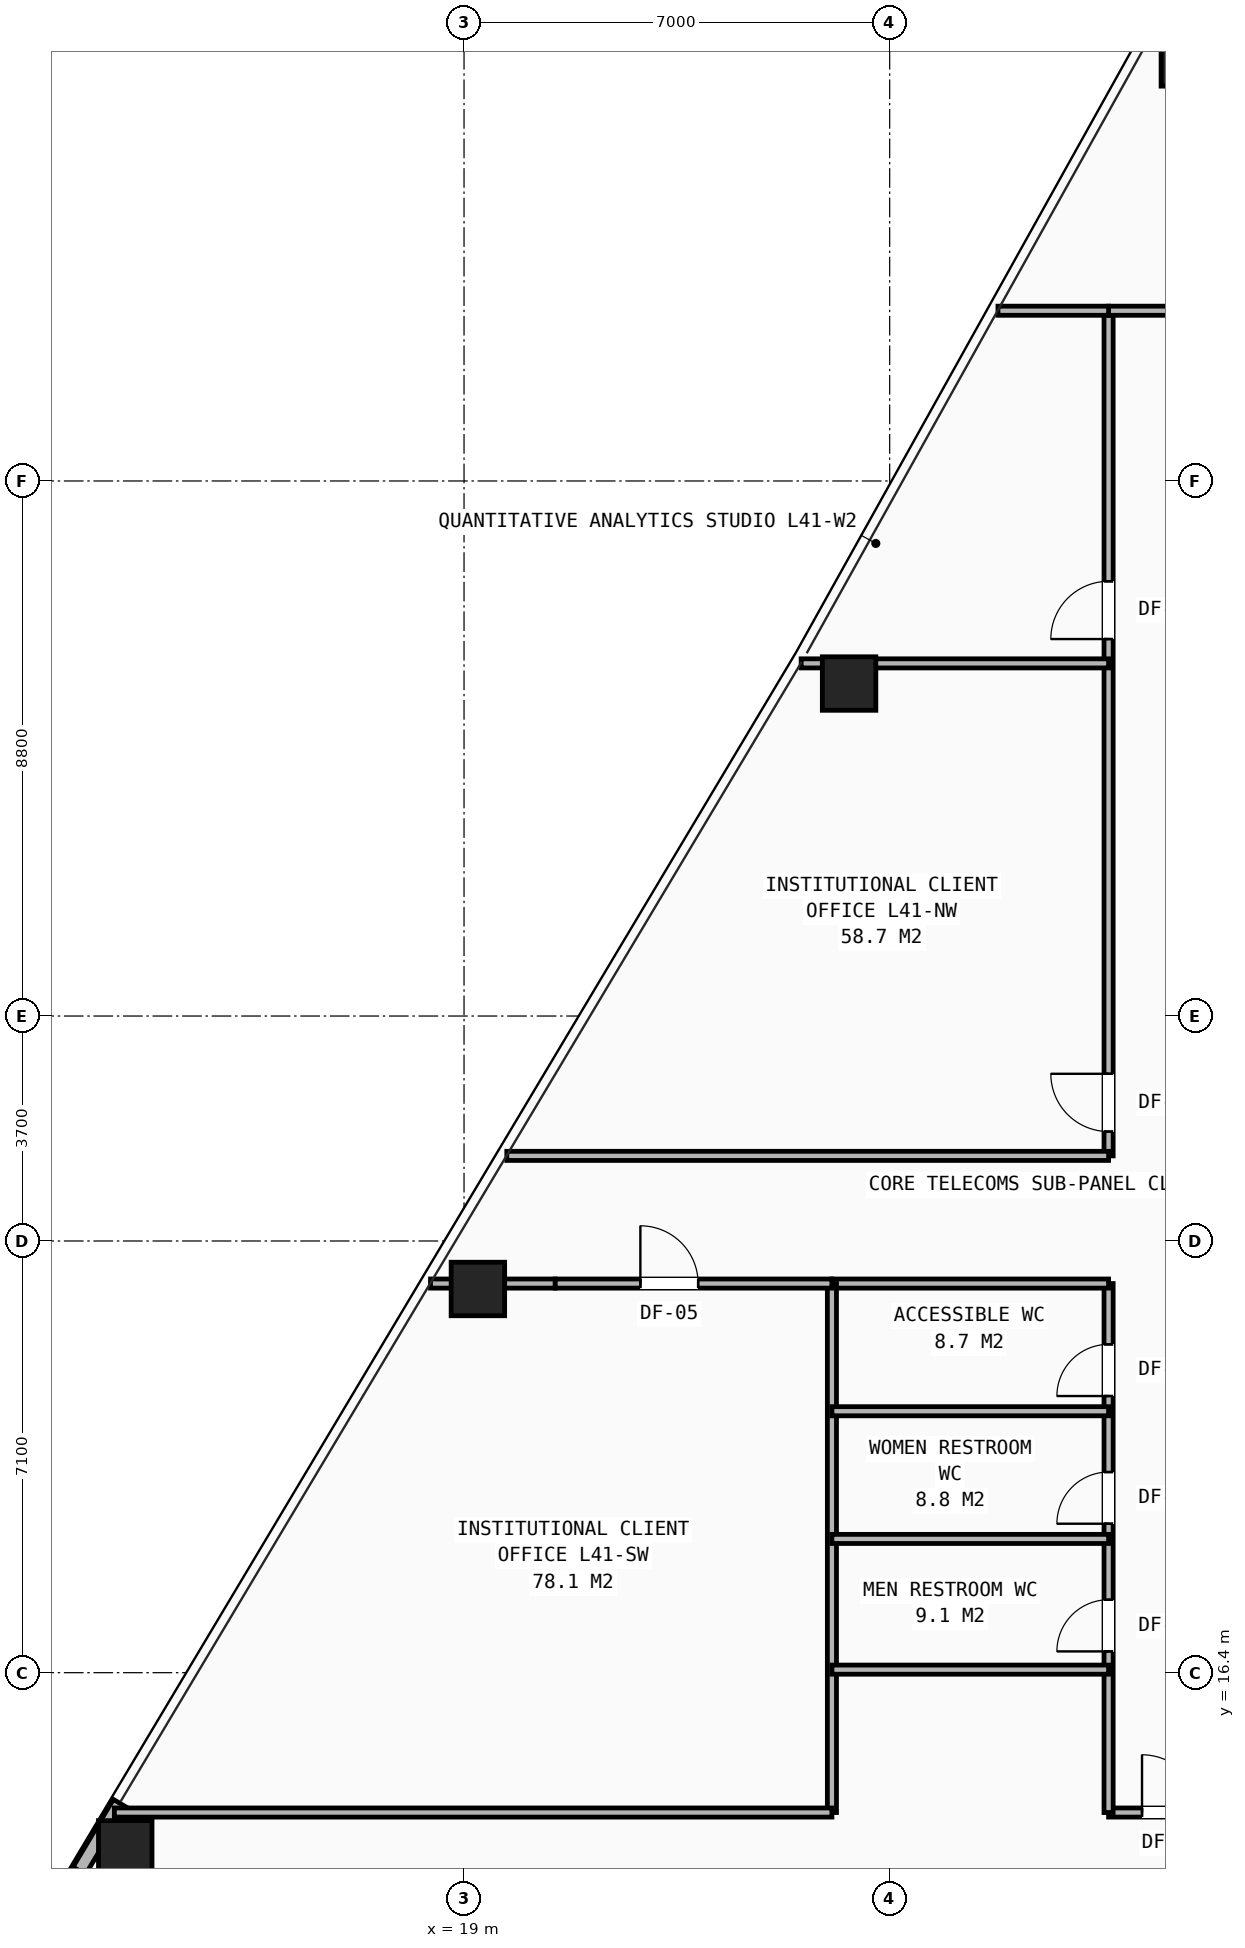
"""IFC4 building model, lengths in metres.
Left out: names, types, materials, properties, quantities, classifications, styles, units other than length and angle.
Written with IfcOpenShell. Run it as: python <this file> out.ifc"""

import sys

from ifc_helpers import new_model, si_unit, direction, frame, frame_2d, origin, origin_2d, place, context, subcontext, project, spatial, rectangle, hollow_rectangle, extrude, element, fill, save


model = new_model("IFC4")
c1 = context("Model", 3, precision=1e-05, world=origin(), true_north=direction((0.0, 1.0)))
c2 = subcontext(c1, "Body", "Model", "MODEL_VIEW")
j1 = project(units=[si_unit("LENGTHUNIT", "METRE"), si_unit("PLANEANGLEUNIT", "RADIAN")], contexts=[c1])
p1 = place(None, origin())
s1 = spatial("IfcSite", under=j1, at=p1, CompositionType="ELEMENT")
p2 = place(p1, origin())
s2 = spatial("IfcBuilding", under=s1, at=p2, CompositionType="ELEMENT")
p3 = place(p2, frame((0.0, 0.0, 143.6)))
s3 = spatial("IfcBuildingStorey", under=s2, at=p3, CompositionType="ELEMENT", Elevation=143.6)
for number, where, z_axis, x_axis in (
    (1, (30.904, 42.934, 0.0), (0.0, 0.0, 1.0), (1.0, 0.0, 0.0)),
    (2, (25.333, 32.668, 0.0), (0.0, 0.0, 1.0), (1.0, 0.0, 0.0)),
    (3, (19.228, 22.711, 0.0), (0.0, 0.0, 1.0), (1.0, 0.0, 0.0)),
    (4, (13.428, 13.527, 0.0), (0.0, 0.0, 1.0), (1.0, 0.0, 0.0)),
):
    element("IfcColumn", number, at=place(p3, frame(where, z_axis=z_axis, x_axis=x_axis)), inside=s3, PredefinedType="COLUMN", context=c2, shape_type="SweptSolid", body=[
        extrude(hollow_rectangle(XDim=0.88, YDim=0.88, WallThickness=0.06, at=origin_2d()), origin(), (0.0, 0.0, 1.0), 3.45),
    ])
p4 = place(p3, frame((13.336, 14.254, 0.0), z_axis=(0.0, 0.0, 1.0), x_axis=(-0.513024934393, -0.858373704567, 0.0)))
e5 = element("IfcWall", 5, at=p4, inside=s3, PredefinedType="SHEAR", context=c2, shape_type="SweptSolid", body=[
    extrude(rectangle(XDim=1.294, YDim=0.24, at=frame_2d((0.647, 0.0))), origin(), (0.0, 0.0, 1.0), 2.583),
])
p5 = place(p3, frame((29.6, 14.1, 0.0), z_axis=(0.0, 0.0, 1.0), x_axis=(1.0, 0.0, 0.0)))
e6 = element("IfcWall", 6, at=p5, inside=s3, PredefinedType="PARTITIONING", context=c2, shape_type="SweptSolid", body=[
    extrude(rectangle(XDim=18.6, YDim=0.15, at=frame_2d((9.3, 0.0))), origin(), (0.0, 0.0, 1.0), 2.252),
])
p6 = place(p5, frame((0.55, 0.0, 0.0)))
e7 = element("IfcOpeningElement", 7, at=p6, cuts=e6, PredefinedType="OPENING", context=c2, shape_type="SweptSolid", body=[
    extrude(rectangle(XDim=0.95, YDim=2.1, at=frame_2d((0.475, 1.05))), frame((0.0, 0.085, 0.0), z_axis=(0.0, -1.0, 0.0), x_axis=(1.0, 0.0, 0.0)), (0.0, 0.0, 1.0), 0.17),
])
p7 = place(p3, frame((29.6, 14.1, 0.0), z_axis=(0.0, 0.0, 1.0), x_axis=(0.0, 1.0, 0.0)))
e8 = element("IfcWall", 8, at=p7, inside=s3, PredefinedType="PARTITIONING", context=c2, shape_type="SweptSolid", body=[
    extrude(rectangle(XDim=8.7, YDim=0.15, at=frame_2d((4.35, 0.0))), origin(), (0.0, 0.0, 1.0), 3.21),
])
p8 = place(p7, frame((2.65, 0.0, 0.0)))
e9 = element("IfcOpeningElement", 9, at=p8, cuts=e8, PredefinedType="OPENING", context=c2, shape_type="SweptSolid", body=[
    extrude(rectangle(XDim=0.85, YDim=2.05, at=frame_2d((0.425, 1.025))), frame((0.0, 0.085, 0.0), z_axis=(0.0, -1.0, 0.0), x_axis=(1.0, 0.0, 0.0)), (0.0, 0.0, 1.0), 0.17),
])
p9 = place(p7, frame((4.75, 0.0, 0.0)))
e10 = element("IfcOpeningElement", 10, at=p9, cuts=e8, PredefinedType="OPENING", context=c2, shape_type="SweptSolid", body=[
    extrude(rectangle(XDim=0.85, YDim=2.05, at=frame_2d((0.425, 1.025))), frame((0.0, 0.085, 0.0), z_axis=(0.0, -1.0, 0.0), x_axis=(1.0, 0.0, 0.0)), (0.0, 0.0, 1.0), 0.17),
])
p10 = place(p7, frame((6.85, 0.0, 0.0)))
e11 = element("IfcOpeningElement", 11, at=p10, cuts=e8, PredefinedType="OPENING", context=c2, shape_type="SweptSolid", body=[
    extrude(rectangle(XDim=0.85, YDim=2.05, at=frame_2d((0.425, 1.025))), frame((0.0, 0.085, 0.0), z_axis=(0.0, -1.0, 0.0), x_axis=(1.0, 0.0, 0.0)), (0.0, 0.0, 1.0), 0.17),
])
p11 = place(p3, frame((29.6, 24.9, 0.0), z_axis=(0.0, 0.0, 1.0), x_axis=(0.0, 1.0, 0.0)))
e12 = element("IfcWall", 12, at=p11, inside=s3, PredefinedType="PARTITIONING", context=c2, shape_type="SweptSolid", body=[
    extrude(rectangle(XDim=13.9, YDim=0.15, at=frame_2d((6.95, 0.0))), origin(), (0.0, 0.0, 1.0), 2.252),
])
p12 = place(p11, frame((0.4, 0.0, 0.0)))
e13 = element("IfcOpeningElement", 13, at=p12, cuts=e12, PredefinedType="OPENING", context=c2, shape_type="SweptSolid", body=[
    extrude(rectangle(XDim=0.95, YDim=2.1, at=frame_2d((0.475, 1.05))), frame((0.0, 0.085, 0.0), z_axis=(0.0, -1.0, 0.0), x_axis=(1.0, 0.0, 0.0)), (0.0, 0.0, 1.0), 0.17),
])
p13 = place(p11, frame((8.5, 0.0, 0.0)))
e14 = element("IfcOpeningElement", 14, at=p13, cuts=e12, PredefinedType="OPENING", context=c2, shape_type="SweptSolid", body=[
    extrude(rectangle(XDim=0.95, YDim=2.1, at=frame_2d((0.475, 1.05))), frame((0.0, 0.085, 0.0), z_axis=(0.0, -1.0, 0.0), x_axis=(1.0, 0.0, 0.0)), (0.0, 0.0, 1.0), 0.17),
])
p14 = place(p3, frame((29.6, 38.8, 0.0), z_axis=(0.0, 0.0, 1.0), x_axis=(1.0, 0.0, 0.0)))
e15 = element("IfcWall", 15, at=p14, inside=s3, PredefinedType="PARTITIONING", context=c2, shape_type="SweptSolid", body=[
    extrude(rectangle(XDim=2.2, YDim=0.15, at=frame_2d((1.1, 0.0))), origin(), (0.0, 0.0, 1.0), 2.743),
])
p15 = place(p3, frame((18.448, 22.8, 0.0), z_axis=(0.0, 0.0, 1.0), x_axis=(1.0, 0.0, 0.0)))
e16 = element("IfcWall", 16, at=p15, inside=s3, PredefinedType="PARTITIONING", context=c2, shape_type="SweptSolid", body=[
    extrude(rectangle(XDim=2.052, YDim=0.15, at=frame_2d((1.026, 0.0))), origin(), (0.0, 0.0, 1.0), 2.589),
])
p16 = place(p3, frame((25.05, 22.8, 0.0), z_axis=(0.0, 0.0, 1.0), x_axis=(1.0, 0.0, 0.0)))
e17 = element("IfcWall", 17, at=p16, inside=s3, PredefinedType="PARTITIONING", context=c2, shape_type="SweptSolid", body=[
    extrude(rectangle(XDim=4.55, YDim=0.15, at=frame_2d((2.275, 0.0))), origin(), (0.0, 0.0, 1.0), 3.21),
])
p17 = place(p3, frame((19.703, 24.9, 0.0), z_axis=(0.0, 0.0, 1.0), x_axis=(1.0, 0.0, 0.0)))
e18 = element("IfcWall", 18, at=p17, inside=s3, PredefinedType="PARTITIONING", context=c2, shape_type="SweptSolid", body=[
    extrude(rectangle(XDim=9.897, YDim=0.15, at=frame_2d((4.948, 0.0))), origin(), (0.0, 0.0, 1.0), 2.589),
])
p18 = place(p3, frame((25.05, 14.1, 0.0), z_axis=(0.0, 0.0, 1.0), x_axis=(0.0, 1.0, 0.0)))
e19 = element("IfcWall", 19, at=p18, inside=s3, PredefinedType="PARTITIONING", context=c2, shape_type="SweptSolid", body=[
    extrude(rectangle(XDim=8.7, YDim=0.15, at=frame_2d((4.35, 0.0))), origin(), (0.0, 0.0, 1.0), 3.21),
])
for number, where, z_axis, x_axis in (
    (20, (25.05, 16.45, 0.0), (0.0, 0.0, 1.0), (1.0, 0.0, 0.0)),
    (21, (25.05, 18.6, 0.0), (0.0, 0.0, 1.0), (1.0, 0.0, 0.0)),
    (22, (25.05, 20.7, 0.0), (0.0, 0.0, 1.0), (1.0, 0.0, 0.0)),
):
    element("IfcWall", number, at=place(p3, frame(where, z_axis=z_axis, x_axis=x_axis)), inside=s3, PredefinedType="PARTITIONING", context=c2, shape_type="SweptSolid", body=[
        extrude(rectangle(XDim=4.55, YDim=0.15, at=frame_2d((2.275, 0.0))), origin(), (0.0, 0.0, 1.0), 3.21),
    ])
p19 = place(p3, frame((13.249, 14.1, 0.0), z_axis=(0.0, 0.0, 1.0), x_axis=(1.0, 0.0, 0.0)))
e23 = element("IfcWall", 23, at=p19, inside=s3, PredefinedType="PARTITIONING", context=c2, shape_type="SweptSolid", body=[
    extrude(rectangle(XDim=11.801, YDim=0.15, at=frame_2d((5.9, 0.0))), origin(), (0.0, 0.0, 1.0), 2.589),
])
p20 = place(p3, frame((20.5, 22.8, 0.0), z_axis=(0.0, 0.0, 1.0), x_axis=(1.0, 0.0, 0.0)))
e24 = element("IfcWall", 24, at=p20, inside=s3, PredefinedType="PARTITIONING", context=c2, shape_type="SweptSolid", body=[
    extrude(rectangle(XDim=4.55, YDim=0.15, at=frame_2d((2.275, 0.0))), origin(), (0.0, 0.0, 1.0), 3.21),
])
p21 = place(p20, frame((1.4, 0.0, 0.0)))
e25 = element("IfcOpeningElement", 25, at=p21, cuts=e24, PredefinedType="OPENING", context=c2, shape_type="SweptSolid", body=[
    extrude(rectangle(XDim=0.95, YDim=2.1, at=frame_2d((0.475, 1.05))), frame((0.0, 0.085, 0.0), z_axis=(0.0, -1.0, 0.0), x_axis=(1.0, 0.0, 0.0)), (0.0, 0.0, 1.0), 0.17),
])
p22 = place(p3, frame((27.781, 38.8, 0.0), z_axis=(0.0, 0.0, 1.0), x_axis=(1.0, 0.0, 0.0)))
e26 = element("IfcWall", 26, at=p22, inside=s3, PredefinedType="PARTITIONING", context=c2, shape_type="SweptSolid", body=[
    extrude(rectangle(XDim=1.819, YDim=0.15, at=frame_2d((0.91, 0.0))), origin(), (0.0, 0.0, 1.0), 2.589),
])
p23 = place(p3, frame((24.544, 33.0, 0.0), z_axis=(0.0, 0.0, 1.0), x_axis=(1.0, 0.0, 0.0)))
e27 = element("IfcWall", 27, at=p23, inside=s3, PredefinedType="PARTITIONING", context=c2, shape_type="SweptSolid", body=[
    extrude(rectangle(XDim=5.056, YDim=0.15, at=frame_2d((2.528, 0.0))), origin(), (0.0, 0.0, 1.0), 2.252),
])
p24 = place(p8, origin())
e28 = element("IfcDoor", 28, at=p24, inside=s3, OperationType="SINGLE_SWING_LEFT", PredefinedType="DOOR", context=c2, shape_type="SweptSolid", body=[
    extrude(rectangle(XDim=0.85, YDim=2.05, at=frame_2d((0.425, 1.025))), frame((0.0, 0.025, 0.0), z_axis=(0.0, -1.0, 0.0), x_axis=(1.0, 0.0, 0.0)), (0.0, 0.0, 1.0), 0.05),
])
fill(e9, e28)
p25 = place(p9, origin())
e29 = element("IfcDoor", 29, at=p25, inside=s3, OperationType="SINGLE_SWING_LEFT", PredefinedType="DOOR", context=c2, shape_type="SweptSolid", body=[
    extrude(rectangle(XDim=0.85, YDim=2.05, at=frame_2d((0.425, 1.025))), frame((0.0, 0.025, 0.0), z_axis=(0.0, -1.0, 0.0), x_axis=(1.0, 0.0, 0.0)), (0.0, 0.0, 1.0), 0.05),
])
fill(e10, e29)
p26 = place(p10, origin())
e30 = element("IfcDoor", 30, at=p26, inside=s3, OperationType="SINGLE_SWING_LEFT", PredefinedType="DOOR", context=c2, shape_type="SweptSolid", body=[
    extrude(rectangle(XDim=0.85, YDim=2.05, at=frame_2d((0.425, 1.025))), frame((0.0, 0.025, 0.0), z_axis=(0.0, -1.0, 0.0), x_axis=(1.0, 0.0, 0.0)), (0.0, 0.0, 1.0), 0.05),
])
fill(e11, e30)
p27 = place(p6, origin())
e31 = element("IfcDoor", 31, at=p27, inside=s3, OperationType="SINGLE_SWING_LEFT", PredefinedType="DOOR", context=c2, shape_type="SweptSolid", body=[
    extrude(rectangle(XDim=0.95, YDim=2.1, at=frame_2d((0.475, 1.05))), frame((0.0, 0.025, 0.0), z_axis=(0.0, -1.0, 0.0), x_axis=(1.0, 0.0, 0.0)), (0.0, 0.0, 1.0), 0.05),
])
fill(e7, e31)
p28 = place(p21, origin())
e32 = element("IfcDoor", 32, at=p28, inside=s3, OperationType="SINGLE_SWING_LEFT", PredefinedType="DOOR", context=c2, shape_type="SweptSolid", body=[
    extrude(rectangle(XDim=0.95, YDim=2.1, at=frame_2d((0.475, 1.05))), frame((0.0, 0.025, 0.0), z_axis=(0.0, -1.0, 0.0), x_axis=(1.0, 0.0, 0.0)), (0.0, 0.0, 1.0), 0.05),
])
fill(e25, e32)
p29 = place(p12, origin())
e33 = element("IfcDoor", 33, at=p29, inside=s3, OperationType="SINGLE_SWING_RIGHT", PredefinedType="DOOR", context=c2, shape_type="SweptSolid", body=[
    extrude(rectangle(XDim=0.95, YDim=2.1, at=frame_2d((0.475, 1.05))), frame((0.0, 0.025, 0.0), z_axis=(0.0, -1.0, 0.0), x_axis=(1.0, 0.0, 0.0)), (0.0, 0.0, 1.0), 0.05),
])
fill(e13, e33)
p30 = place(p13, origin())
e34 = element("IfcDoor", 34, at=p30, inside=s3, OperationType="SINGLE_SWING_LEFT", PredefinedType="DOOR", context=c2, shape_type="SweptSolid", body=[
    extrude(rectangle(XDim=0.95, YDim=2.1, at=frame_2d((0.475, 1.05))), frame((0.0, 0.025, 0.0), z_axis=(0.0, -1.0, 0.0), x_axis=(1.0, 0.0, 0.0)), (0.0, 0.0, 1.0), 0.05),
])
fill(e14, e34)
save(model, sys.argv[1])
